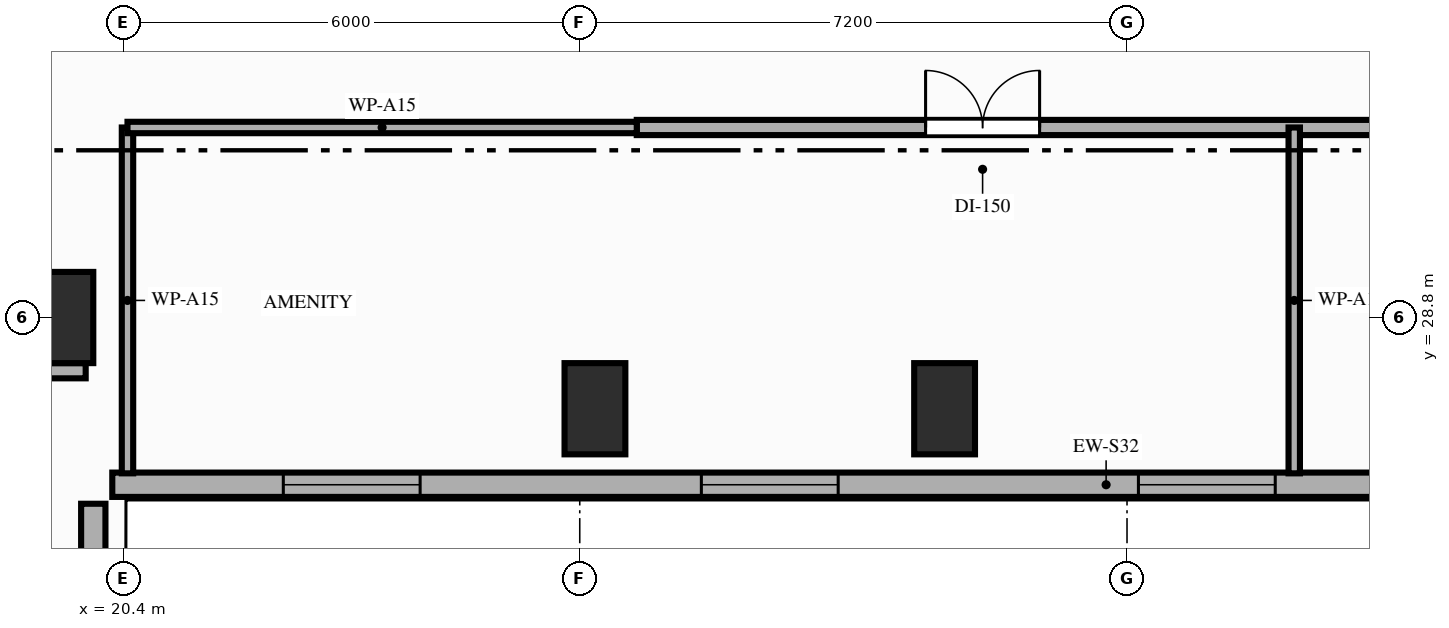
"""IFC4 building model, lengths in metres.
Left out: names, types, materials, properties, quantities, classifications, styles, units other than length and angle.
Written with IfcOpenShell. Run it as: python <this file> out.ifc"""

import sys

from ifc_helpers import new_model, si_unit, direction, frame, frame_2d, origin, origin_2d, place, context, subcontext, project, spatial, rectangle, extrude, element, fill, save


model = new_model("IFC4")
c1 = context("Model", 3, precision=1e-05, world=origin(), true_north=direction((0.0, 1.0)))
c2 = subcontext(c1, "Body", "Model", "MODEL_VIEW")
j1 = project(units=[si_unit("LENGTHUNIT", "METRE"), si_unit("PLANEANGLEUNIT", "RADIAN")], contexts=[c1])
p1 = place(None, origin())
s1 = spatial("IfcSite", under=j1, at=p1, CompositionType="ELEMENT")
p2 = place(p1, origin())
s2 = spatial("IfcBuilding", under=s1, at=p2, CompositionType="ELEMENT")
p3 = place(p2, frame((0.0, 0.0, 102.6)))
s3 = spatial("IfcBuildingStorey", under=s2, at=p3, CompositionType="ELEMENT", Elevation=102.6)
for number, where, z_axis, x_axis in (
    (1, (19.6, 28.8, 0.0), (0.0, 0.0, 1.0), (1.0, 0.0, 0.0)),
    (2, (26.6, 27.6, 0.0), (0.0, 0.0, 1.0), (1.0, 0.0, 0.0)),
    (3, (31.2, 27.6, 0.0), (0.0, 0.0, 1.0), (1.0, 0.0, 0.0)),
):
    element("IfcColumn", number, at=place(p3, frame(where, z_axis=z_axis, x_axis=x_axis)), inside=s3, PredefinedType="COLUMN", context=c2, shape_type="SweptSolid", body=[
        extrude(rectangle(XDim=0.8, YDim=1.2, at=origin_2d()), origin(), (0.0, 0.0, 1.0), 4.8),
    ])
p4 = place(p3, frame((20.0, 8.8, 0.0), z_axis=(0.0, 0.0, 1.0), x_axis=(0.0, 1.0, 0.0)))
e4 = element("IfcWall", 4, at=p4, inside=s3, PredefinedType="STANDARD", context=c2, shape_type="SweptSolid", body=[
    extrude(rectangle(XDim=17.55, YDim=0.32, at=frame_2d((8.775, 0.0))), origin(), (0.0, 0.0, 1.0), 3.95),
])
p5 = place(p4, frame((9.94, 0.0, 0.85)))
e5 = element("IfcOpeningElement", 5, at=p5, cuts=e4, PredefinedType="OPENING", context=c2, shape_type="SweptSolid", body=[
    extrude(rectangle(XDim=1.1, YDim=1.7, at=frame_2d((0.55, 0.85))), frame((0.0, 0.17, 0.0), z_axis=(0.0, -1.0, 0.0), x_axis=(1.0, 0.0, 0.0)), (0.0, 0.0, 1.0), 0.34),
])
p6 = place(p3, frame((20.25, 26.6, 0.0), z_axis=(0.0, 0.0, 1.0), x_axis=(1.0, 0.0, 0.0)))
e6 = element("IfcWall", 6, at=p6, inside=s3, PredefinedType="STANDARD", context=c2, shape_type="SweptSolid", body=[
    extrude(rectangle(XDim=26.15, YDim=0.32, at=frame_2d((13.075, 0.0))), origin(), (0.0, 0.0, 1.0), 4.26),
])
p7 = place(p6, frame((2.25, 0.0, 0.85)))
e7 = element("IfcOpeningElement", 7, at=p7, cuts=e6, PredefinedType="OPENING", context=c2, shape_type="SweptSolid", body=[
    extrude(rectangle(XDim=1.8, YDim=1.75, at=frame_2d((0.9, 0.875))), frame((0.0, 0.17, 0.0), z_axis=(0.0, -1.0, 0.0), x_axis=(1.0, 0.0, 0.0)), (0.0, 0.0, 1.0), 0.34),
])
p8 = place(p6, frame((7.75, 0.0, 0.85)))
e8 = element("IfcOpeningElement", 8, at=p8, cuts=e6, PredefinedType="OPENING", context=c2, shape_type="SweptSolid", body=[
    extrude(rectangle(XDim=1.8, YDim=1.75, at=frame_2d((0.9, 0.875))), frame((0.0, 0.17, 0.0), z_axis=(0.0, -1.0, 0.0), x_axis=(1.0, 0.0, 0.0)), (0.0, 0.0, 1.0), 0.34),
])
p9 = place(p6, frame((13.5, 0.0, 0.85)))
e9 = element("IfcOpeningElement", 9, at=p9, cuts=e6, PredefinedType="OPENING", context=c2, shape_type="SweptSolid", body=[
    extrude(rectangle(XDim=1.8, YDim=1.75, at=frame_2d((0.9, 0.875))), frame((0.0, 0.17, 0.0), z_axis=(0.0, -1.0, 0.0), x_axis=(1.0, 0.0, 0.0)), (0.0, 0.0, 1.0), 0.34),
])
p10 = place(p6, frame((22.25, 0.0, 0.85)))
e10 = element("IfcOpeningElement", 10, at=p10, cuts=e6, PredefinedType="OPENING", context=c2, shape_type="SweptSolid", body=[
    extrude(rectangle(XDim=1.8, YDim=1.75, at=frame_2d((0.9, 0.875))), frame((0.0, 0.17, 0.0), z_axis=(0.0, -1.0, 0.0), x_axis=(1.0, 0.0, 0.0)), (0.0, 0.0, 1.0), 0.34),
])
p11 = place(p3, frame((11.01, 28.1, 0.0), z_axis=(0.0, 0.0, 1.0), x_axis=(1.0, 0.0, 0.0)))
e11 = element("IfcWall", 11, at=p11, inside=s3, PredefinedType="PARTITIONING", context=c2, shape_type="SweptSolid", body=[
    extrude(rectangle(XDim=8.89, YDim=0.2, at=frame_2d((4.445, 0.0))), origin(), (0.0, 0.0, 1.0), 3.95),
])
p12 = place(p3, frame((27.15, 31.3, 0.0), z_axis=(0.0, 0.0, 1.0), x_axis=(1.0, 0.0, 0.0)))
e12 = element("IfcWall", 12, at=p12, inside=s3, PredefinedType="PARTITIONING", context=c2, shape_type="SweptSolid", body=[
    extrude(rectangle(XDim=19.35, YDim=0.2, at=frame_2d((9.675, 0.0))), origin(), (0.0, 0.0, 1.0), 3.95),
])
p13 = place(p12, frame((3.8, 0.0, 0.0)))
e13 = element("IfcOpeningElement", 13, at=p13, cuts=e12, PredefinedType="OPENING", context=c2, shape_type="SweptSolid", body=[
    extrude(rectangle(XDim=1.5, YDim=2.18, at=frame_2d((0.75, 1.09))), frame((0.0, 0.11, 0.0), z_axis=(0.0, -1.0, 0.0), x_axis=(1.0, 0.0, 0.0)), (0.0, 0.0, 1.0), 0.22),
])
p14 = place(p12, frame((12.6, 0.0, 0.0)))
e14 = element("IfcOpeningElement", 14, at=p14, cuts=e12, PredefinedType="OPENING", context=c2, shape_type="SweptSolid", body=[
    extrude(rectangle(XDim=1.0, YDim=2.15, at=frame_2d((0.5, 1.075))), frame((0.0, 0.11, 0.0), z_axis=(0.0, -1.0, 0.0), x_axis=(1.0, 0.0, 0.0)), (0.0, 0.0, 1.0), 0.22),
])
p15 = place(p3, frame((20.45, 26.75, 0.0), z_axis=(0.0, 0.0, 1.0), x_axis=(0.0, 1.0, 0.0)))
e15 = element("IfcWall", 15, at=p15, inside=s3, PredefinedType="PARTITIONING", context=c2, shape_type="SweptSolid", body=[
    extrude(rectangle(XDim=4.55, YDim=0.15, at=frame_2d((2.275, 0.0))), origin(), (0.0, 0.0, 1.0), 3.95),
])
p16 = place(p3, frame((20.45, 31.3, 0.0), z_axis=(0.0, 0.0, 1.0), x_axis=(1.0, 0.0, 0.0)))
e16 = element("IfcWall", 16, at=p16, inside=s3, PredefinedType="PARTITIONING", context=c2, shape_type="SweptSolid", body=[
    extrude(rectangle(XDim=6.7, YDim=0.15, at=frame_2d((3.35, 0.0))), origin(), (0.0, 0.0, 1.0), 4.56),
])
p17 = place(p3, frame((35.8, 26.75, 0.0), z_axis=(0.0, 0.0, 1.0), x_axis=(0.0, 1.0, 0.0)))
e17 = element("IfcWall", 17, at=p17, inside=s3, PredefinedType="PARTITIONING", context=c2, shape_type="SweptSolid", body=[
    extrude(rectangle(XDim=4.55, YDim=0.15, at=frame_2d((2.275, 0.0))), origin(), (0.0, 0.0, 1.0), 3.95),
])
p18 = place(p7, origin())
e18 = element("IfcWindow", 18, at=p18, inside=s3, PartitioningType="SINGLE_PANEL", PredefinedType="WINDOW", context=c2, shape_type="SweptSolid", body=[
    extrude(rectangle(XDim=1.8, YDim=1.75, at=frame_2d((0.9, 0.875))), frame((0.0, 0.03, 0.0), z_axis=(0.0, -1.0, 0.0), x_axis=(1.0, 0.0, 0.0)), (0.0, 0.0, 1.0), 0.06),
])
fill(e7, e18)
p19 = place(p8, origin())
e19 = element("IfcWindow", 19, at=p19, inside=s3, PartitioningType="SINGLE_PANEL", PredefinedType="WINDOW", context=c2, shape_type="SweptSolid", body=[
    extrude(rectangle(XDim=1.8, YDim=1.75, at=frame_2d((0.9, 0.875))), frame((0.0, 0.03, 0.0), z_axis=(0.0, -1.0, 0.0), x_axis=(1.0, 0.0, 0.0)), (0.0, 0.0, 1.0), 0.06),
])
fill(e8, e19)
p20 = place(p9, origin())
e20 = element("IfcWindow", 20, at=p20, inside=s3, PartitioningType="SINGLE_PANEL", PredefinedType="WINDOW", context=c2, shape_type="SweptSolid", body=[
    extrude(rectangle(XDim=1.8, YDim=1.75, at=frame_2d((0.9, 0.875))), frame((0.0, 0.03, 0.0), z_axis=(0.0, -1.0, 0.0), x_axis=(1.0, 0.0, 0.0)), (0.0, 0.0, 1.0), 0.06),
])
fill(e9, e20)
p21 = place(p13, origin())
e21 = element("IfcDoor", 21, at=p21, inside=s3, OperationType="DOUBLE_DOOR_SINGLE_SWING", PredefinedType="DOOR", context=c2, shape_type="SweptSolid", body=[
    extrude(rectangle(XDim=1.5, YDim=2.18, at=frame_2d((0.75, 1.09))), frame((0.0, 0.025, 0.0), z_axis=(0.0, -1.0, 0.0), x_axis=(1.0, 0.0, 0.0)), (0.0, 0.0, 1.0), 0.05),
])
fill(e13, e21)
save(model, sys.argv[1])
